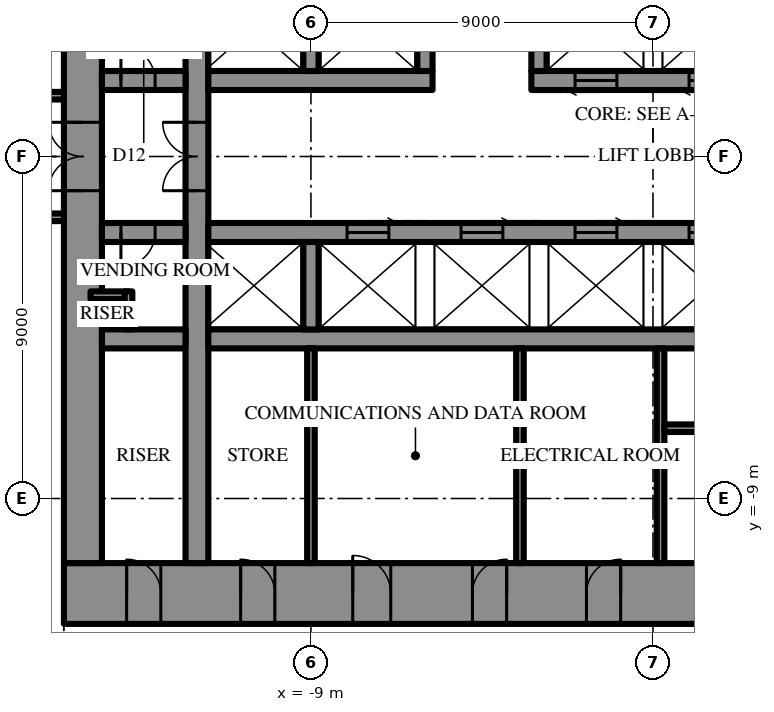
"""IFC4 building model, lengths in metres.
Left out: names, types, materials, properties, quantities, classifications, styles, units other than length and angle.
Written with IfcOpenShell. Run it as: python <this file> out.ifc"""

import sys

from ifc_helpers import new_model, si_unit, direction, frame, frame_2d, origin, place, context, subcontext, project, spatial, rectangle, extrude, element, fill, save


model = new_model("IFC4")
c1 = context("Model", 3, precision=1e-05, world=origin(), true_north=direction((0.0, 1.0)))
c2 = subcontext(c1, "Body", "Model", "MODEL_VIEW")
j1 = project(units=[si_unit("LENGTHUNIT", "METRE"), si_unit("PLANEANGLEUNIT", "RADIAN")], contexts=[c1])
p1 = place(None, origin())
s1 = spatial("IfcSite", under=j1, at=p1, CompositionType="ELEMENT")
p2 = place(p1, origin())
s2 = spatial("IfcBuilding", under=s1, at=p2, CompositionType="ELEMENT")
p3 = place(p2, frame((0.0, 0.0, 219.7)))
s3 = spatial("IfcBuildingStorey", under=s2, at=p3, CompositionType="ELEMENT", Elevation=219.7)
p4 = place(p3, frame((15.5, -11.5, 0.0), z_axis=(0.0, 0.0, 1.0), x_axis=(-1.0, 0.0, 0.0)))
e1 = element("IfcWall", 1, at=p4, inside=s3, PredefinedType="SHEAR", context=c2, shape_type="SweptSolid", body=[
    extrude(rectangle(XDim=31.0, YDim=1.6, at=frame_2d((15.5, 0.0))), origin(), (0.0, 0.0, 1.0), 4.2),
])
p5 = place(p4, frame((16.35, 0.0, 0.0)))
e2 = element("IfcOpeningElement", 2, at=p5, cuts=e1, PredefinedType="OPENING", context=c2, shape_type="SweptSolid", body=[
    extrude(rectangle(XDim=0.9, YDim=2.2, at=frame_2d((0.45, 1.1))), frame((0.0, 0.81, 0.0), z_axis=(0.0, -1.0, 0.0), x_axis=(1.0, 0.0, 0.0)), (0.0, 0.0, 1.0), 1.62),
])
p6 = place(p4, frame((19.35, 0.0, 0.0)))
e3 = element("IfcOpeningElement", 3, at=p6, cuts=e1, PredefinedType="OPENING", context=c2, shape_type="SweptSolid", body=[
    extrude(rectangle(XDim=0.9, YDim=2.2, at=frame_2d((0.45, 1.1))), frame((0.0, 0.81, 0.0), z_axis=(0.0, -1.0, 0.0), x_axis=(1.0, 0.0, 0.0)), (0.0, 0.0, 1.0), 1.62),
])
p7 = place(p4, frame((22.4, 0.0, 0.0)))
e4 = element("IfcOpeningElement", 4, at=p7, cuts=e1, PredefinedType="OPENING", context=c2, shape_type="SweptSolid", body=[
    extrude(rectangle(XDim=1.0, YDim=2.2, at=frame_2d((0.5, 1.1))), frame((0.0, 0.81, 0.0), z_axis=(0.0, -1.0, 0.0), x_axis=(1.0, 0.0, 0.0)), (0.0, 0.0, 1.0), 1.62),
])
p8 = place(p4, frame((1.65, 0.0, 0.0)))
e5 = element("IfcOpeningElement", 5, at=p8, cuts=e1, PredefinedType="OPENING", context=c2, shape_type="SweptSolid", body=[
    extrude(rectangle(XDim=0.9, YDim=2.2, at=frame_2d((0.45, 1.1))), frame((0.0, 0.81, 0.0), z_axis=(0.0, -1.0, 0.0), x_axis=(1.0, 0.0, 0.0)), (0.0, 0.0, 1.0), 1.62),
])
p9 = place(p4, frame((4.65, 0.0, 0.0)))
e6 = element("IfcOpeningElement", 6, at=p9, cuts=e1, PredefinedType="OPENING", context=c2, shape_type="SweptSolid", body=[
    extrude(rectangle(XDim=0.9, YDim=2.2, at=frame_2d((0.45, 1.1))), frame((0.0, 0.81, 0.0), z_axis=(0.0, -1.0, 0.0), x_axis=(1.0, 0.0, 0.0)), (0.0, 0.0, 1.0), 1.62),
])
p10 = place(p4, frame((25.45, 0.0, 0.0)))
e7 = element("IfcOpeningElement", 7, at=p10, cuts=e1, PredefinedType="OPENING", context=c2, shape_type="SweptSolid", body=[
    extrude(rectangle(XDim=0.9, YDim=2.2, at=frame_2d((0.45, 1.1))), frame((0.0, 0.81, 0.0), z_axis=(0.0, -1.0, 0.0), x_axis=(1.0, 0.0, 0.0)), (0.0, 0.0, 1.0), 1.62),
])
p11 = place(p4, frame((28.45, 0.0, 0.0)))
e8 = element("IfcOpeningElement", 8, at=p11, cuts=e1, PredefinedType="OPENING", context=c2, shape_type="SweptSolid", body=[
    extrude(rectangle(XDim=0.9, YDim=2.2, at=frame_2d((0.45, 1.1))), frame((0.0, 0.81, 0.0), z_axis=(0.0, -1.0, 0.0), x_axis=(1.0, 0.0, 0.0)), (0.0, 0.0, 1.0), 1.62),
])
p12 = place(p3, frame((-15.0, 10.7, 0.0), z_axis=(0.0, 0.0, 1.0), x_axis=(0.0, -1.0, 0.0)))
e9 = element("IfcWall", 9, at=p12, inside=s3, PredefinedType="SHEAR", context=c2, shape_type="SweptSolid", body=[
    extrude(rectangle(XDim=21.4, YDim=1.0, at=frame_2d((10.7, 0.0))), origin(), (0.0, 0.0, 1.0), 4.2),
])
p13 = place(p12, frame((9.8, 0.0, 0.0)))
e10 = element("IfcOpeningElement", 10, at=p13, cuts=e9, PredefinedType="OPENING", context=c2, shape_type="SweptSolid", body=[
    extrude(rectangle(XDim=1.8, YDim=2.4, at=frame_2d((0.9, 1.2))), frame((0.0, 0.51, 0.0), z_axis=(0.0, -1.0, 0.0), x_axis=(1.0, 0.0, 0.0)), (0.0, 0.0, 1.0), 1.02),
])
p14 = place(p3, frame((-12.0, -10.7, 0.0), z_axis=(0.0, 0.0, 1.0), x_axis=(0.0, 1.0, 0.0)))
e11 = element("IfcWall", 11, at=p14, inside=s3, PredefinedType="SHEAR", context=c2, shape_type="SweptSolid", body=[
    extrude(rectangle(XDim=21.4, YDim=0.6, at=frame_2d((10.7, 0.0))), origin(), (0.0, 0.0, 1.0), 4.2),
])
p15 = place(p14, frame((9.8, 0.0, 0.0)))
e12 = element("IfcOpeningElement", 12, at=p15, cuts=e11, PredefinedType="OPENING", context=c2, shape_type="SweptSolid", body=[
    extrude(rectangle(XDim=1.8, YDim=2.4, at=frame_2d((0.9, 1.2))), frame((0.0, 0.31, 0.0), z_axis=(0.0, -1.0, 0.0), x_axis=(1.0, 0.0, 0.0)), (0.0, 0.0, 1.0), 0.62),
])
p16 = place(p3, frame((-14.5, 2.0, 0.0), z_axis=(0.0, 0.0, 1.0), x_axis=(1.0, 0.0, 0.0)))
e13 = element("IfcWall", 13, at=p16, inside=s3, PredefinedType="SHEAR", context=c2, shape_type="SweptSolid", body=[
    extrude(rectangle(XDim=2.2, YDim=0.5, at=frame_2d((1.1, 0.0))), origin(), (0.0, 0.0, 1.0), 4.2),
])
p17 = place(p16, frame((0.5, 0.0, 0.0)))
e14 = element("IfcOpeningElement", 14, at=p17, cuts=e13, PredefinedType="OPENING", context=c2, shape_type="SweptSolid", body=[
    extrude(rectangle(XDim=0.9, YDim=2.2, at=frame_2d((0.45, 1.1))), frame((0.0, 0.26, 0.0), z_axis=(0.0, -1.0, 0.0), x_axis=(1.0, 0.0, 0.0)), (0.0, 0.0, 1.0), 0.52),
])
p18 = place(p3, frame((-11.7, 2.0, 0.0), z_axis=(0.0, 0.0, 1.0), x_axis=(1.0, 0.0, 0.0)))
e15 = element("IfcWall", 15, at=p18, inside=s3, PredefinedType="SHEAR", context=c2, shape_type="SweptSolid", body=[
    extrude(rectangle(XDim=5.9, YDim=0.5, at=frame_2d((2.95, 0.0))), origin(), (0.0, 0.0, 1.0), 4.2),
])
p19 = place(p3, frame((-3.2, 2.0, 0.0), z_axis=(0.0, 0.0, 1.0), x_axis=(1.0, 0.0, 0.0)))
e16 = element("IfcWall", 16, at=p19, inside=s3, PredefinedType="SHEAR", context=c2, shape_type="SweptSolid", body=[
    extrude(rectangle(XDim=14.9, YDim=0.5, at=frame_2d((7.45, 0.0))), origin(), (0.0, 0.0, 1.0), 4.2),
])
p20 = place(p19, frame((1.15, 0.0, 0.0)))
e17 = element("IfcOpeningElement", 17, at=p20, cuts=e16, PredefinedType="OPENING", context=c2, shape_type="SweptSolid", body=[
    extrude(rectangle(XDim=1.1, YDim=2.2, at=frame_2d((0.55, 1.1))), frame((0.0, 0.26, 0.0), z_axis=(0.0, -1.0, 0.0), x_axis=(1.0, 0.0, 0.0)), (0.0, 0.0, 1.0), 0.52),
])
p21 = place(p19, frame((4.15, 0.0, 0.0)))
e18 = element("IfcOpeningElement", 18, at=p21, cuts=e16, PredefinedType="OPENING", context=c2, shape_type="SweptSolid", body=[
    extrude(rectangle(XDim=1.1, YDim=2.2, at=frame_2d((0.55, 1.1))), frame((0.0, 0.26, 0.0), z_axis=(0.0, -1.0, 0.0), x_axis=(1.0, 0.0, 0.0)), (0.0, 0.0, 1.0), 0.52),
])
p22 = place(p19, frame((7.15, 0.0, 0.0)))
e19 = element("IfcOpeningElement", 19, at=p22, cuts=e16, PredefinedType="OPENING", context=c2, shape_type="SweptSolid", body=[
    extrude(rectangle(XDim=1.1, YDim=2.2, at=frame_2d((0.55, 1.1))), frame((0.0, 0.26, 0.0), z_axis=(0.0, -1.0, 0.0), x_axis=(1.0, 0.0, 0.0)), (0.0, 0.0, 1.0), 0.52),
])
p23 = place(p19, frame((10.15, 0.0, 0.0)))
e20 = element("IfcOpeningElement", 20, at=p23, cuts=e16, PredefinedType="OPENING", context=c2, shape_type="SweptSolid", body=[
    extrude(rectangle(XDim=1.1, YDim=2.2, at=frame_2d((0.55, 1.1))), frame((0.0, 0.26, 0.0), z_axis=(0.0, -1.0, 0.0), x_axis=(1.0, 0.0, 0.0)), (0.0, 0.0, 1.0), 0.52),
])
for number, where, z_axis, x_axis in (
    (21, (-9.0, 2.25, 0.0), (0.0, 0.0, 1.0), (0.0, 1.0, 0.0)),
    (22, (-6.0, 2.25, 0.0), (0.0, 0.0, 1.0), (0.0, 1.0, 0.0)),
    (23, (-3.0, 2.25, 0.0), (0.0, 0.0, 1.0), (0.0, 1.0, 0.0)),
):
    element("IfcWall", number, at=place(p3, frame(where, z_axis=z_axis, x_axis=x_axis)), inside=s3, PredefinedType="SHEAR", context=c2, shape_type="SweptSolid", body=[
        extrude(rectangle(XDim=2.3, YDim=0.4, at=frame_2d((1.15, 0.0))), origin(), (0.0, 0.0, 1.0), 4.2),
    ])
p24 = place(p3, frame((3.2, -2.0, 0.0), z_axis=(0.0, 0.0, 1.0), x_axis=(-1.0, 0.0, 0.0)))
e24 = element("IfcWall", 24, at=p24, inside=s3, PredefinedType="SHEAR", context=c2, shape_type="SweptSolid", body=[
    extrude(rectangle(XDim=14.9, YDim=0.5, at=frame_2d((7.45, 0.0))), origin(), (0.0, 0.0, 1.0), 4.2),
])
p25 = place(p24, frame((1.15, 0.0, 0.0)))
e25 = element("IfcOpeningElement", 25, at=p25, cuts=e24, PredefinedType="OPENING", context=c2, shape_type="SweptSolid", body=[
    extrude(rectangle(XDim=1.1, YDim=2.2, at=frame_2d((0.55, 1.1))), frame((0.0, 0.26, 0.0), z_axis=(0.0, -1.0, 0.0), x_axis=(1.0, 0.0, 0.0)), (0.0, 0.0, 1.0), 0.52),
])
p26 = place(p24, frame((4.15, 0.0, 0.0)))
e26 = element("IfcOpeningElement", 26, at=p26, cuts=e24, PredefinedType="OPENING", context=c2, shape_type="SweptSolid", body=[
    extrude(rectangle(XDim=1.1, YDim=2.2, at=frame_2d((0.55, 1.1))), frame((0.0, 0.26, 0.0), z_axis=(0.0, -1.0, 0.0), x_axis=(1.0, 0.0, 0.0)), (0.0, 0.0, 1.0), 0.52),
])
p27 = place(p24, frame((7.15, 0.0, 0.0)))
e27 = element("IfcOpeningElement", 27, at=p27, cuts=e24, PredefinedType="OPENING", context=c2, shape_type="SweptSolid", body=[
    extrude(rectangle(XDim=1.1, YDim=2.2, at=frame_2d((0.55, 1.1))), frame((0.0, 0.26, 0.0), z_axis=(0.0, -1.0, 0.0), x_axis=(1.0, 0.0, 0.0)), (0.0, 0.0, 1.0), 0.52),
])
p28 = place(p24, frame((10.15, 0.0, 0.0)))
e28 = element("IfcOpeningElement", 28, at=p28, cuts=e24, PredefinedType="OPENING", context=c2, shape_type="SweptSolid", body=[
    extrude(rectangle(XDim=1.1, YDim=2.2, at=frame_2d((0.55, 1.1))), frame((0.0, 0.26, 0.0), z_axis=(0.0, -1.0, 0.0), x_axis=(1.0, 0.0, 0.0)), (0.0, 0.0, 1.0), 0.52),
])
p29 = place(p3, frame((-12.3, -2.0, 0.0), z_axis=(0.0, 0.0, 1.0), x_axis=(-1.0, 0.0, 0.0)))
e29 = element("IfcWall", 29, at=p29, inside=s3, PredefinedType="SHEAR", context=c2, shape_type="SweptSolid", body=[
    extrude(rectangle(XDim=2.2, YDim=0.5, at=frame_2d((1.1, 0.0))), origin(), (0.0, 0.0, 1.0), 4.2),
])
p30 = place(p29, frame((0.8, 0.0, 0.0)))
e30 = element("IfcOpeningElement", 30, at=p30, cuts=e29, PredefinedType="OPENING", context=c2, shape_type="SweptSolid", body=[
    extrude(rectangle(XDim=0.9, YDim=2.2, at=frame_2d((0.45, 1.1))), frame((0.0, 0.26, 0.0), z_axis=(0.0, -1.0, 0.0), x_axis=(1.0, 0.0, 0.0)), (0.0, 0.0, 1.0), 0.52),
])
p31 = place(p3, frame((11.7, -4.8, 0.0), z_axis=(0.0, 0.0, 1.0), x_axis=(-1.0, 0.0, 0.0)))
e31 = element("IfcWall", 31, at=p31, inside=s3, PredefinedType="SHEAR", context=c2, shape_type="SweptSolid", body=[
    extrude(rectangle(XDim=23.4, YDim=0.5, at=frame_2d((11.7, 0.0))), origin(), (0.0, 0.0, 1.0), 4.2),
])
p32 = place(p31, frame((6.6, 0.0, 0.0)))
e32 = element("IfcOpeningElement", 32, at=p32, cuts=e31, PredefinedType="OPENING", context=c2, shape_type="SweptSolid", body=[
    extrude(rectangle(XDim=1.2, YDim=2.2, at=frame_2d((0.6, 1.1))), frame((0.0, 0.26, 0.0), z_axis=(0.0, -1.0, 0.0), x_axis=(1.0, 0.0, 0.0)), (0.0, 0.0, 1.0), 0.52),
])
p33 = place(p31, frame((3.6, 0.0, 0.0)))
e33 = element("IfcOpeningElement", 33, at=p33, cuts=e31, PredefinedType="OPENING", context=c2, shape_type="SweptSolid", body=[
    extrude(rectangle(XDim=1.2, YDim=2.2, at=frame_2d((0.6, 1.1))), frame((0.0, 0.26, 0.0), z_axis=(0.0, -1.0, 0.0), x_axis=(1.0, 0.0, 0.0)), (0.0, 0.0, 1.0), 0.52),
])
p34 = place(p3, frame((-12.3, -4.8, 0.0), z_axis=(0.0, 0.0, 1.0), x_axis=(-1.0, 0.0, 0.0)))
e34 = element("IfcWall", 34, at=p34, inside=s3, PredefinedType="SHEAR", context=c2, shape_type="SweptSolid", body=[
    extrude(rectangle(XDim=2.2, YDim=0.5, at=frame_2d((1.1, 0.0))), origin(), (0.0, 0.0, 1.0), 4.2),
])
p35 = place(p3, frame((-9.0, -2.25, 0.0), z_axis=(0.0, 0.0, 1.0), x_axis=(0.0, -1.0, 0.0)))
e35 = element("IfcWall", 35, at=p35, inside=s3, PredefinedType="SHEAR", context=c2, shape_type="SweptSolid", body=[
    extrude(rectangle(XDim=2.3, YDim=0.4, at=frame_2d((1.15, 0.0))), origin(), (0.0, 0.0, 1.0), 4.2),
])
p36 = place(p3, frame((0.2, -5.05, 0.0), z_axis=(0.0, 0.0, 1.0), x_axis=(0.0, -1.0, 0.0)))
e36 = element("IfcWall", 36, at=p36, inside=s3, PredefinedType="SHEAR", context=c2, shape_type="SweptSolid", body=[
    extrude(rectangle(XDim=5.65, YDim=0.2, at=frame_2d((2.825, 0.0))), origin(), (0.0, 0.0, 1.0), 4.2),
])
p37 = place(p3, frame((8.9, -7.15, 0.0), z_axis=(0.0, 0.0, 1.0), x_axis=(-1.0, 0.0, 0.0)))
e37 = element("IfcWall", 37, at=p37, inside=s3, PredefinedType="SHEAR", context=c2, shape_type="SweptSolid", body=[
    extrude(rectangle(XDim=8.6, YDim=0.2, at=frame_2d((4.3, 0.0))), origin(), (0.0, 0.0, 1.0), 4.2),
])
p38 = place(p37, frame((0.3, 0.0, 0.0)))
e38 = element("IfcOpeningElement", 38, at=p38, cuts=e37, PredefinedType="OPENING", context=c2, shape_type="SweptSolid", body=[
    extrude(rectangle(XDim=1.0, YDim=2.2, at=frame_2d((0.5, 1.1))), frame((0.0, 0.11, 0.0), z_axis=(0.0, -1.0, 0.0), x_axis=(1.0, 0.0, 0.0)), (0.0, 0.0, 1.0), 0.22),
])
for number, where, z_axis, x_axis in (
    (39, (-9.0, -5.05, 0.0), (0.0, 0.0, 1.0), (0.0, -1.0, 0.0)),
    (40, (-3.5, -5.05, 0.0), (0.0, 0.0, 1.0), (0.0, -1.0, 0.0)),
):
    element("IfcWall", number, at=place(p3, frame(where, z_axis=z_axis, x_axis=x_axis)), inside=s3, PredefinedType="PARTITIONING", context=c2, shape_type="SweptSolid", body=[
        extrude(rectangle(XDim=5.65, YDim=0.2, at=frame_2d((2.825, 0.0))), origin(), (0.0, 0.0, 1.0), 4.0),
    ])
for number, where, z_axis, x_axis in (
    (41, (-13.8, -3.65, 0.0), (0.0, 0.0, 1.0), (-1.0, 0.0, 0.0)),
    (42, (-13.8, -3.55, 0.0), (0.0, 0.0, 1.0), (0.0, -1.0, 0.0)),
):
    element("IfcWall", number, at=place(p3, frame(where, z_axis=z_axis, x_axis=x_axis)), inside=s3, PredefinedType="PARTITIONING", context=c2, shape_type="SweptSolid", body=[
        extrude(rectangle(XDim=1.0, YDim=0.2, at=frame_2d((0.5, 0.0))), origin(), (0.0, 0.0, 1.0), 4.0),
    ])
p39 = place(p3, frame((-15.5, 1.6, 0.0), z_axis=(0.0, 0.0, 1.0), x_axis=(-1.0, 0.0, 0.0)))
e43 = element("IfcWall", 43, at=p39, inside=s3, PredefinedType="PARTITIONING", context=c2, shape_type="SweptSolid", body=[
    extrude(rectangle(XDim=12.2, YDim=0.2, at=frame_2d((6.1, 0.0))), origin(), (0.0, 0.0, 1.0), 4.0),
])
p40 = place(p39, frame((3.16, 0.0, 0.0)))
e44 = element("IfcOpeningElement", 44, at=p40, cuts=e43, PredefinedType="OPENING", context=c2, shape_type="SweptSolid", body=[
    extrude(rectangle(XDim=1.0, YDim=2.2, at=frame_2d((0.5, 1.1))), frame((0.0, 0.11, 0.0), z_axis=(0.0, -1.0, 0.0), x_axis=(1.0, 0.0, 0.0)), (0.0, 0.0, 1.0), 0.22),
])
p41 = place(p3, frame((-15.5, -1.6, 0.0), z_axis=(0.0, 0.0, 1.0), x_axis=(-1.0, 0.0, 0.0)))
e45 = element("IfcWall", 45, at=p41, inside=s3, PredefinedType="PARTITIONING", context=c2, shape_type="SweptSolid", body=[
    extrude(rectangle(XDim=12.2, YDim=0.2, at=frame_2d((6.1, 0.0))), origin(), (0.0, 0.0, 1.0), 4.0),
])
p42 = place(p41, frame((3.16, 0.0, 0.0)))
e46 = element("IfcOpeningElement", 46, at=p42, cuts=e45, PredefinedType="OPENING", context=c2, shape_type="SweptSolid", body=[
    extrude(rectangle(XDim=1.0, YDim=2.2, at=frame_2d((0.5, 1.1))), frame((0.0, 0.11, 0.0), z_axis=(0.0, -1.0, 0.0), x_axis=(1.0, 0.0, 0.0)), (0.0, 0.0, 1.0), 0.22),
])
p43 = place(p13, frame((1.8, 0.0, 0.0), z_axis=(0.0, 0.0, 1.0), x_axis=(-1.0, 0.0, 0.0)))
e47 = element("IfcDoor", 47, at=p43, inside=s3, OperationType="DOUBLE_DOOR_SINGLE_SWING", PredefinedType="DOOR", context=c2, shape_type="SweptSolid", body=[
    extrude(rectangle(XDim=1.8, YDim=2.4, at=frame_2d((0.9, 1.2))), frame((0.0, 0.025, 0.0), z_axis=(0.0, -1.0, 0.0), x_axis=(1.0, 0.0, 0.0)), (0.0, 0.0, 1.0), 0.05),
])
fill(e10, e47)
p44 = place(p5, frame((0.9, 0.0, 0.0), z_axis=(0.0, 0.0, 1.0), x_axis=(-1.0, 0.0, 0.0)))
e48 = element("IfcDoor", 48, at=p44, inside=s3, OperationType="SINGLE_SWING_LEFT", PredefinedType="DOOR", context=c2, shape_type="SweptSolid", body=[
    extrude(rectangle(XDim=0.9, YDim=2.2, at=frame_2d((0.45, 1.1))), frame((0.0, 0.025, 0.0), z_axis=(0.0, -1.0, 0.0), x_axis=(1.0, 0.0, 0.0)), (0.0, 0.0, 1.0), 0.05),
])
fill(e2, e48)
p45 = place(p6, frame((0.9, 0.0, 0.0), z_axis=(0.0, 0.0, 1.0), x_axis=(-1.0, 0.0, 0.0)))
e49 = element("IfcDoor", 49, at=p45, inside=s3, OperationType="SINGLE_SWING_LEFT", PredefinedType="DOOR", context=c2, shape_type="SweptSolid", body=[
    extrude(rectangle(XDim=0.9, YDim=2.2, at=frame_2d((0.45, 1.1))), frame((0.0, 0.025, 0.0), z_axis=(0.0, -1.0, 0.0), x_axis=(1.0, 0.0, 0.0)), (0.0, 0.0, 1.0), 0.05),
])
fill(e3, e49)
p46 = place(p7, frame((1.0, 0.0, 0.0), z_axis=(0.0, 0.0, 1.0), x_axis=(-1.0, 0.0, 0.0)))
e50 = element("IfcDoor", 50, at=p46, inside=s3, OperationType="SINGLE_SWING_RIGHT", PredefinedType="DOOR", context=c2, shape_type="SweptSolid", body=[
    extrude(rectangle(XDim=1.0, YDim=2.2, at=frame_2d((0.5, 1.1))), frame((0.0, 0.025, 0.0), z_axis=(0.0, -1.0, 0.0), x_axis=(1.0, 0.0, 0.0)), (0.0, 0.0, 1.0), 0.05),
])
fill(e4, e50)
p47 = place(p10, frame((0.9, 0.0, 0.0), z_axis=(0.0, 0.0, 1.0), x_axis=(-1.0, 0.0, 0.0)))
e51 = element("IfcDoor", 51, at=p47, inside=s3, OperationType="SINGLE_SWING_RIGHT", PredefinedType="DOOR", context=c2, shape_type="SweptSolid", body=[
    extrude(rectangle(XDim=0.9, YDim=2.2, at=frame_2d((0.45, 1.1))), frame((0.0, 0.025, 0.0), z_axis=(0.0, -1.0, 0.0), x_axis=(1.0, 0.0, 0.0)), (0.0, 0.0, 1.0), 0.05),
])
fill(e7, e51)
p48 = place(p11, frame((0.9, 0.0, 0.0), z_axis=(0.0, 0.0, 1.0), x_axis=(-1.0, 0.0, 0.0)))
e52 = element("IfcDoor", 52, at=p48, inside=s3, OperationType="SINGLE_SWING_RIGHT", PredefinedType="DOOR", context=c2, shape_type="SweptSolid", body=[
    extrude(rectangle(XDim=0.9, YDim=2.2, at=frame_2d((0.45, 1.1))), frame((0.0, 0.025, 0.0), z_axis=(0.0, -1.0, 0.0), x_axis=(1.0, 0.0, 0.0)), (0.0, 0.0, 1.0), 0.05),
])
fill(e8, e52)
p49 = place(p17, origin())
e53 = element("IfcDoor", 53, at=p49, inside=s3, OperationType="SINGLE_SWING_RIGHT", PredefinedType="DOOR", context=c2, shape_type="SweptSolid", body=[
    extrude(rectangle(XDim=0.9, YDim=2.2, at=frame_2d((0.45, 1.1))), frame((0.0, 0.025, 0.0), z_axis=(0.0, -1.0, 0.0), x_axis=(1.0, 0.0, 0.0)), (0.0, 0.0, 1.0), 0.05),
])
fill(e14, e53)
p50 = place(p30, origin())
e54 = element("IfcDoor", 54, at=p50, inside=s3, OperationType="SINGLE_SWING_LEFT", PredefinedType="DOOR", context=c2, shape_type="SweptSolid", body=[
    extrude(rectangle(XDim=0.9, YDim=2.2, at=frame_2d((0.45, 1.1))), frame((0.0, 0.025, 0.0), z_axis=(0.0, -1.0, 0.0), x_axis=(1.0, 0.0, 0.0)), (0.0, 0.0, 1.0), 0.05),
])
fill(e30, e54)
p51 = place(p15, origin())
e55 = element("IfcDoor", 55, at=p51, inside=s3, OperationType="DOUBLE_DOOR_SINGLE_SWING", PredefinedType="DOOR", context=c2, shape_type="SweptSolid", body=[
    extrude(rectangle(XDim=1.8, YDim=2.4, at=frame_2d((0.9, 1.2))), frame((0.0, 0.025, 0.0), z_axis=(0.0, -1.0, 0.0), x_axis=(1.0, 0.0, 0.0)), (0.0, 0.0, 1.0), 0.05),
])
fill(e12, e55)
p52 = place(p20, frame((1.1, 0.0, 0.0), z_axis=(0.0, 0.0, 1.0), x_axis=(-1.0, 0.0, 0.0)))
e56 = element("IfcDoor", 56, at=p52, inside=s3, OperationType="SLIDING_TO_LEFT", PredefinedType="DOOR", context=c2, shape_type="SweptSolid", body=[
    extrude(rectangle(XDim=1.1, YDim=2.2, at=frame_2d((0.55, 1.1))), frame((0.0, 0.025, 0.0), z_axis=(0.0, -1.0, 0.0), x_axis=(1.0, 0.0, 0.0)), (0.0, 0.0, 1.0), 0.05),
])
fill(e17, e56)
p53 = place(p21, frame((1.1, 0.0, 0.0), z_axis=(0.0, 0.0, 1.0), x_axis=(-1.0, 0.0, 0.0)))
e57 = element("IfcDoor", 57, at=p53, inside=s3, OperationType="SLIDING_TO_LEFT", PredefinedType="DOOR", context=c2, shape_type="SweptSolid", body=[
    extrude(rectangle(XDim=1.1, YDim=2.2, at=frame_2d((0.55, 1.1))), frame((0.0, 0.025, 0.0), z_axis=(0.0, -1.0, 0.0), x_axis=(1.0, 0.0, 0.0)), (0.0, 0.0, 1.0), 0.05),
])
fill(e18, e57)
p54 = place(p25, frame((1.1, 0.0, 0.0), z_axis=(0.0, 0.0, 1.0), x_axis=(-1.0, 0.0, 0.0)))
e58 = element("IfcDoor", 58, at=p54, inside=s3, OperationType="SLIDING_TO_LEFT", PredefinedType="DOOR", context=c2, shape_type="SweptSolid", body=[
    extrude(rectangle(XDim=1.1, YDim=2.2, at=frame_2d((0.55, 1.1))), frame((0.0, 0.025, 0.0), z_axis=(0.0, -1.0, 0.0), x_axis=(1.0, 0.0, 0.0)), (0.0, 0.0, 1.0), 0.05),
])
fill(e25, e58)
p55 = place(p26, frame((1.1, 0.0, 0.0), z_axis=(0.0, 0.0, 1.0), x_axis=(-1.0, 0.0, 0.0)))
e59 = element("IfcDoor", 59, at=p55, inside=s3, OperationType="SLIDING_TO_LEFT", PredefinedType="DOOR", context=c2, shape_type="SweptSolid", body=[
    extrude(rectangle(XDim=1.1, YDim=2.2, at=frame_2d((0.55, 1.1))), frame((0.0, 0.025, 0.0), z_axis=(0.0, -1.0, 0.0), x_axis=(1.0, 0.0, 0.0)), (0.0, 0.0, 1.0), 0.05),
])
fill(e26, e59)
p56 = place(p27, frame((1.1, 0.0, 0.0), z_axis=(0.0, 0.0, 1.0), x_axis=(-1.0, 0.0, 0.0)))
e60 = element("IfcDoor", 60, at=p56, inside=s3, OperationType="SLIDING_TO_LEFT", PredefinedType="DOOR", context=c2, shape_type="SweptSolid", body=[
    extrude(rectangle(XDim=1.1, YDim=2.2, at=frame_2d((0.55, 1.1))), frame((0.0, 0.025, 0.0), z_axis=(0.0, -1.0, 0.0), x_axis=(1.0, 0.0, 0.0)), (0.0, 0.0, 1.0), 0.05),
])
fill(e27, e60)
p57 = place(p28, frame((1.1, 0.0, 0.0), z_axis=(0.0, 0.0, 1.0), x_axis=(-1.0, 0.0, 0.0)))
e61 = element("IfcDoor", 61, at=p57, inside=s3, OperationType="SLIDING_TO_LEFT", PredefinedType="DOOR", context=c2, shape_type="SweptSolid", body=[
    extrude(rectangle(XDim=1.1, YDim=2.2, at=frame_2d((0.55, 1.1))), frame((0.0, 0.025, 0.0), z_axis=(0.0, -1.0, 0.0), x_axis=(1.0, 0.0, 0.0)), (0.0, 0.0, 1.0), 0.05),
])
fill(e28, e61)
save(model, sys.argv[1])
